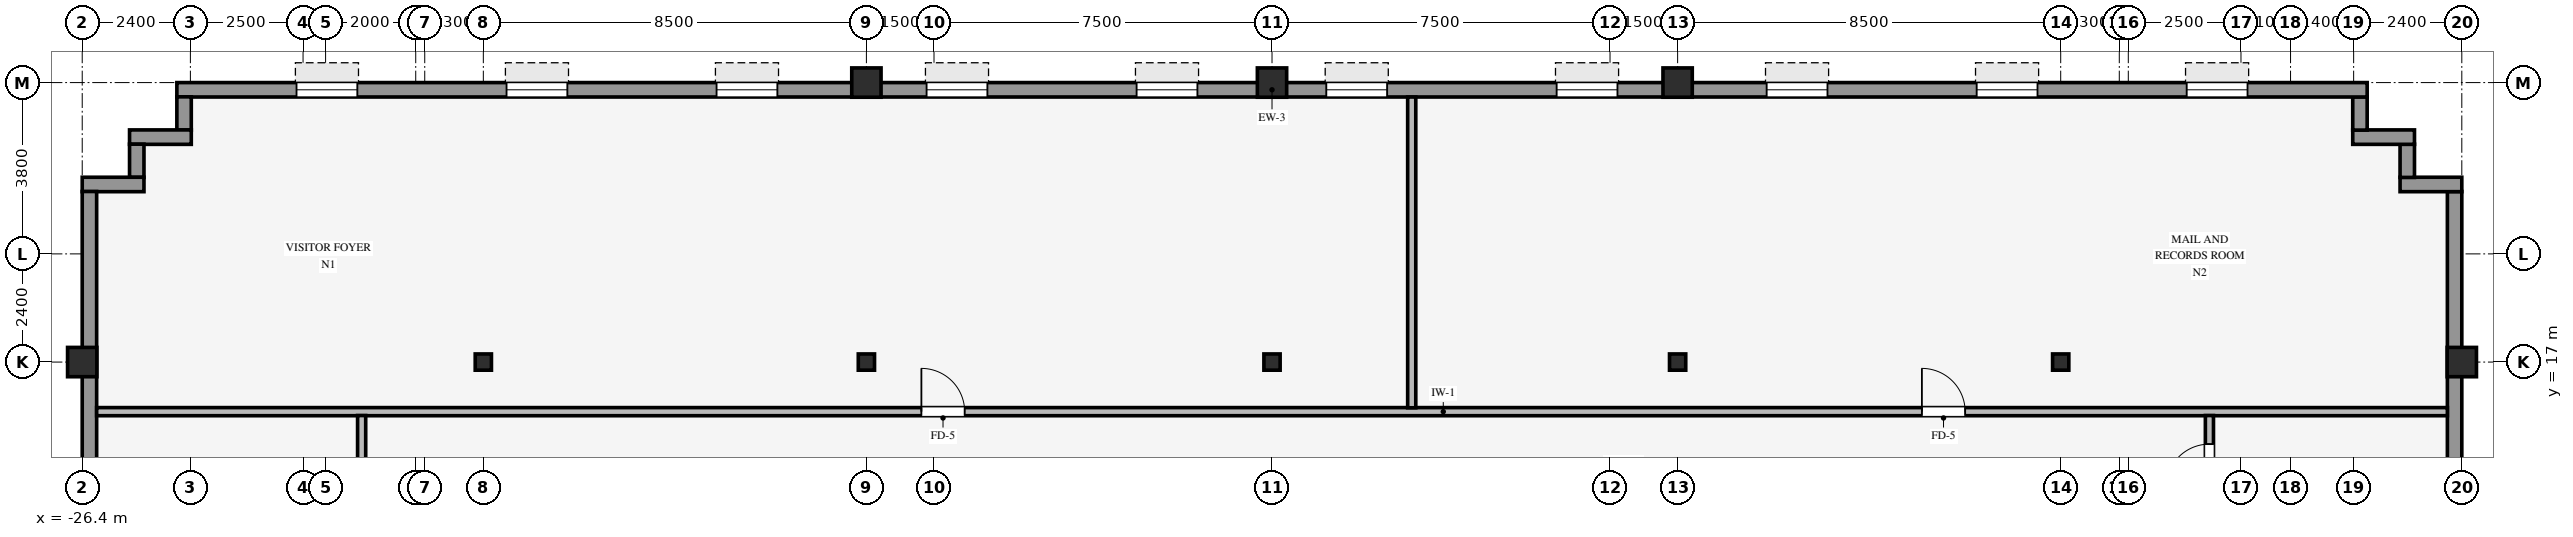
"""IFC4 building model, lengths in metres.
Left out: names, types, materials, properties, quantities, classifications, styles, units other than length and angle.
Written with IfcOpenShell. Run it as: python <this file> out.ifc"""

import sys

from ifc_helpers import new_model, si_unit, direction, frame, frame_2d, origin, origin_2d, place, context, subcontext, project, spatial, rectangle, hollow_rectangle, i_section, extrude, source, transform, mapped, element, fill, save


model = new_model("IFC4")
c1 = context("Model", 3, precision=1e-05, world=origin(), true_north=direction((0.0, 1.0)))
c2 = subcontext(c1, "Body", "Model", "MODEL_VIEW")
j1 = project(units=[si_unit("LENGTHUNIT", "METRE"), si_unit("PLANEANGLEUNIT", "RADIAN")], contexts=[c1])
p1 = place(None, origin())
s1 = spatial("IfcSite", under=j1, at=p1, CompositionType="ELEMENT")
p2 = place(p1, origin())
s2 = spatial("IfcBuilding", under=s1, at=p2, CompositionType="ELEMENT")
p3 = place(p2, frame((0.0, 0.0, 127.5)))
s3 = spatial("IfcBuildingStorey", under=s2, at=p3, CompositionType="ELEMENT", Elevation=127.5)
for number, where, z_axis, x_axis in (
    (1, (-26.4, 17.0, 0.0), (0.0, 0.0, 1.0), (1.0, 0.0, 0.0)),
    (2, (26.4, 17.0, 0.0), (0.0, 0.0, 1.0), (1.0, 0.0, 0.0)),
    (3, (-9.0, 23.2, 0.0), (0.0, 0.0, 1.0), (1.0, 0.0, 0.0)),
    (4, (0.0, 23.2, 0.0), (0.0, 0.0, 1.0), (1.0, 0.0, 0.0)),
    (5, (9.0, 23.2, 0.0), (0.0, 0.0, 1.0), (1.0, 0.0, 0.0)),
):
    element("IfcColumn", number, at=place(p3, frame(where, z_axis=z_axis, x_axis=x_axis)), inside=s3, PredefinedType="COLUMN", context=c2, shape_type="SweptSolid", body=[
        extrude(hollow_rectangle(XDim=0.65, YDim=0.65, WallThickness=0.04, InnerFilletRadius=0.04, OuterFilletRadius=0.08, at=origin_2d()), origin(), (0.0, 0.0, 1.0), 3.37),
    ])
for number, where, z_axis, x_axis in (
    (6, (0.0, 17.0, 0.0), (0.0, 0.0, 1.0), (1.0, 0.0, 0.0)),
    (7, (-17.5, 17.0, 0.0), (0.0, 0.0, 1.0), (1.0, 0.0, 0.0)),
    (8, (-9.0, 17.0, 0.0), (0.0, 0.0, 1.0), (1.0, 0.0, 0.0)),
    (9, (9.0, 17.0, 0.0), (0.0, 0.0, 1.0), (1.0, 0.0, 0.0)),
    (10, (17.5, 17.0, 0.0), (0.0, 0.0, 1.0), (1.0, 0.0, 0.0)),
):
    element("IfcColumn", number, at=place(p3, frame(where, z_axis=z_axis, x_axis=x_axis)), inside=s3, PredefinedType="COLUMN", context=c2, shape_type="SweptSolid", body=[
        extrude(i_section(OverallWidth=0.36, OverallDepth=0.36, WebThickness=0.021, FlangeThickness=0.021, FilletRadius=0.018, at=origin_2d()), origin(), (0.0, 0.0, 1.0), 3.37),
    ])
p4 = place(p3, frame((26.24, -20.784, 0.0), z_axis=(0.0, 0.0, 1.0), x_axis=(0.0, 1.0, 0.0)))
e11 = element("IfcWall", 11, at=p4, inside=s3, PredefinedType="STANDARD", context=c2, shape_type="SweptSolid", body=[
    extrude(rectangle(XDim=41.568, YDim=0.32, at=frame_2d((20.784, 0.0))), origin(), (0.0, 0.0, 1.0), 2.705),
])
p5 = place(p4, frame((7.369, 0.0, 0.8)))
e12 = element("IfcOpeningElement", 12, at=p5, cuts=e11, PredefinedType="OPENING", context=c2, shape_type="SweptSolid", body=[
    extrude(rectangle(XDim=2.1, YDim=1.56, at=frame_2d((1.05, 0.78))), frame((0.0, 0.17, 0.0), z_axis=(0.0, -1.0, 0.0), x_axis=(1.0, 0.0, 0.0)), (0.0, 0.0, 1.0), 0.34),
])
p6 = place(p4, frame((12.315, 0.0, 0.8)))
e13 = element("IfcOpeningElement", 13, at=p6, cuts=e11, PredefinedType="OPENING", context=c2, shape_type="SweptSolid", body=[
    extrude(rectangle(XDim=2.1, YDim=1.56, at=frame_2d((1.05, 0.78))), frame((0.0, 0.17, 0.0), z_axis=(0.0, -1.0, 0.0), x_axis=(1.0, 0.0, 0.0)), (0.0, 0.0, 1.0), 0.34),
])
p7 = place(p4, frame((17.711, 0.0, 0.8)))
e14 = element("IfcOpeningElement", 14, at=p7, cuts=e11, PredefinedType="OPENING", context=c2, shape_type="SweptSolid", body=[
    extrude(rectangle(XDim=2.1, YDim=1.56, at=frame_2d((1.05, 0.78))), frame((0.0, 0.17, 0.0), z_axis=(0.0, -1.0, 0.0), x_axis=(1.0, 0.0, 0.0)), (0.0, 0.0, 1.0), 0.34),
])
p8 = place(p4, frame((22.207, 0.0, 0.8)))
e15 = element("IfcOpeningElement", 15, at=p8, cuts=e11, PredefinedType="OPENING", context=c2, shape_type="SweptSolid", body=[
    extrude(rectangle(XDim=2.1, YDim=1.56, at=frame_2d((1.05, 0.78))), frame((0.0, 0.17, 0.0), z_axis=(0.0, -1.0, 0.0), x_axis=(1.0, 0.0, 0.0)), (0.0, 0.0, 1.0), 0.34),
])
p9 = place(p4, frame((27.153, 0.0, 0.8)))
e16 = element("IfcOpeningElement", 16, at=p9, cuts=e11, PredefinedType="OPENING", context=c2, shape_type="SweptSolid", body=[
    extrude(rectangle(XDim=2.1, YDim=1.56, at=frame_2d((1.05, 0.78))), frame((0.0, 0.17, 0.0), z_axis=(0.0, -1.0, 0.0), x_axis=(1.0, 0.0, 0.0)), (0.0, 0.0, 1.0), 0.34),
])
p10 = place(p4, frame((32.099, 0.0, 0.8)))
e17 = element("IfcOpeningElement", 17, at=p10, cuts=e11, PredefinedType="OPENING", context=c2, shape_type="SweptSolid", body=[
    extrude(rectangle(XDim=2.1, YDim=1.56, at=frame_2d((1.05, 0.78))), frame((0.0, 0.17, 0.0), z_axis=(0.0, -1.0, 0.0), x_axis=(1.0, 0.0, 0.0)), (0.0, 0.0, 1.0), 0.34),
])
p11 = place(p3, frame((25.03, 20.94, 0.0), z_axis=(0.0, 0.0, 1.0), x_axis=(1.0, 0.0, 0.0)))
e18 = element("IfcWall", 18, at=p11, inside=s3, PredefinedType="STANDARD", context=c2, shape_type="SweptSolid", body=[
    extrude(rectangle(XDim=1.37, YDim=0.32, at=frame_2d((0.685, 0.0))), origin(), (0.0, 0.0, 1.0), 3.36),
])
p12 = place(p3, frame((25.19, 21.096, 0.0), z_axis=(0.0, 0.0, 1.0), x_axis=(0.0, 1.0, 0.0)))
e19 = element("IfcWall", 19, at=p12, inside=s3, PredefinedType="STANDARD", context=c2, shape_type="SweptSolid", body=[
    extrude(rectangle(XDim=0.738, YDim=0.32, at=frame_2d((0.369, 0.0))), origin(), (0.0, 0.0, 1.0), 3.36),
])
p13 = place(p3, frame((23.98, 21.99, 0.0), z_axis=(0.0, 0.0, 1.0), x_axis=(1.0, 0.0, 0.0)))
e20 = element("IfcWall", 20, at=p13, inside=s3, PredefinedType="STANDARD", context=c2, shape_type="SweptSolid", body=[
    extrude(rectangle(XDim=1.37, YDim=0.32, at=frame_2d((0.685, 0.0))), origin(), (0.0, 0.0, 1.0), 3.36),
])
p14 = place(p3, frame((24.14, 22.146, 0.0), z_axis=(0.0, 0.0, 1.0), x_axis=(0.0, 1.0, 0.0)))
e21 = element("IfcWall", 21, at=p14, inside=s3, PredefinedType="STANDARD", context=c2, shape_type="SweptSolid", body=[
    extrude(rectangle(XDim=0.738, YDim=0.32, at=frame_2d((0.369, 0.0))), origin(), (0.0, 0.0, 1.0), 3.36),
])
p15 = place(p3, frame((-24.3, 23.04, 0.0), z_axis=(0.0, 0.0, 1.0), x_axis=(1.0, 0.0, 0.0)))
e22 = element("IfcWall", 22, at=p15, inside=s3, PredefinedType="STANDARD", context=c2, shape_type="SweptSolid", body=[
    extrude(rectangle(XDim=48.6, YDim=0.32, at=frame_2d((24.3, 0.0))), origin(), (0.0, 0.0, 1.0), 2.705),
])
p16 = place(p15, frame((2.655, 0.0, 0.8)))
e23 = element("IfcOpeningElement", 23, at=p16, cuts=e22, PredefinedType="OPENING", context=c2, shape_type="SweptSolid", body=[
    extrude(rectangle(XDim=1.35, YDim=1.56, at=frame_2d((0.675, 0.78))), frame((0.0, 0.17, 0.0), z_axis=(0.0, -1.0, 0.0), x_axis=(1.0, 0.0, 0.0)), (0.0, 0.0, 1.0), 0.34),
])
p17 = place(p15, frame((7.315, 0.0, 0.8)))
e24 = element("IfcOpeningElement", 24, at=p17, cuts=e22, PredefinedType="OPENING", context=c2, shape_type="SweptSolid", body=[
    extrude(rectangle(XDim=1.35, YDim=1.56, at=frame_2d((0.675, 0.78))), frame((0.0, 0.17, 0.0), z_axis=(0.0, -1.0, 0.0), x_axis=(1.0, 0.0, 0.0)), (0.0, 0.0, 1.0), 0.34),
])
p18 = place(p15, frame((11.975, 0.0, 0.8)))
e25 = element("IfcOpeningElement", 25, at=p18, cuts=e22, PredefinedType="OPENING", context=c2, shape_type="SweptSolid", body=[
    extrude(rectangle(XDim=1.35, YDim=1.56, at=frame_2d((0.675, 0.78))), frame((0.0, 0.17, 0.0), z_axis=(0.0, -1.0, 0.0), x_axis=(1.0, 0.0, 0.0)), (0.0, 0.0, 1.0), 0.34),
])
p19 = place(p15, frame((16.635, 0.0, 0.8)))
e26 = element("IfcOpeningElement", 26, at=p19, cuts=e22, PredefinedType="OPENING", context=c2, shape_type="SweptSolid", body=[
    extrude(rectangle(XDim=1.35, YDim=1.56, at=frame_2d((0.675, 0.78))), frame((0.0, 0.17, 0.0), z_axis=(0.0, -1.0, 0.0), x_axis=(1.0, 0.0, 0.0)), (0.0, 0.0, 1.0), 0.34),
])
p20 = place(p15, frame((21.295, 0.0, 0.8)))
e27 = element("IfcOpeningElement", 27, at=p20, cuts=e22, PredefinedType="OPENING", context=c2, shape_type="SweptSolid", body=[
    extrude(rectangle(XDim=1.35, YDim=1.56, at=frame_2d((0.675, 0.78))), frame((0.0, 0.17, 0.0), z_axis=(0.0, -1.0, 0.0), x_axis=(1.0, 0.0, 0.0)), (0.0, 0.0, 1.0), 0.34),
])
p21 = place(p15, frame((25.505, 0.0, 0.8)))
e28 = element("IfcOpeningElement", 28, at=p21, cuts=e22, PredefinedType="OPENING", context=c2, shape_type="SweptSolid", body=[
    extrude(rectangle(XDim=1.35, YDim=1.56, at=frame_2d((0.675, 0.78))), frame((0.0, 0.17, 0.0), z_axis=(0.0, -1.0, 0.0), x_axis=(1.0, 0.0, 0.0)), (0.0, 0.0, 1.0), 0.34),
])
p22 = place(p15, frame((30.615, 0.0, 0.8)))
e29 = element("IfcOpeningElement", 29, at=p22, cuts=e22, PredefinedType="OPENING", context=c2, shape_type="SweptSolid", body=[
    extrude(rectangle(XDim=1.35, YDim=1.56, at=frame_2d((0.675, 0.78))), frame((0.0, 0.17, 0.0), z_axis=(0.0, -1.0, 0.0), x_axis=(1.0, 0.0, 0.0)), (0.0, 0.0, 1.0), 0.34),
])
p23 = place(p15, frame((35.275, 0.0, 0.8)))
e30 = element("IfcOpeningElement", 30, at=p23, cuts=e22, PredefinedType="OPENING", context=c2, shape_type="SweptSolid", body=[
    extrude(rectangle(XDim=1.35, YDim=1.56, at=frame_2d((0.675, 0.78))), frame((0.0, 0.17, 0.0), z_axis=(0.0, -1.0, 0.0), x_axis=(1.0, 0.0, 0.0)), (0.0, 0.0, 1.0), 0.34),
])
p24 = place(p15, frame((39.935, 0.0, 0.8)))
e31 = element("IfcOpeningElement", 31, at=p24, cuts=e22, PredefinedType="OPENING", context=c2, shape_type="SweptSolid", body=[
    extrude(rectangle(XDim=1.35, YDim=1.56, at=frame_2d((0.675, 0.78))), frame((0.0, 0.17, 0.0), z_axis=(0.0, -1.0, 0.0), x_axis=(1.0, 0.0, 0.0)), (0.0, 0.0, 1.0), 0.34),
])
p25 = place(p15, frame((44.595, 0.0, 0.8)))
e32 = element("IfcOpeningElement", 32, at=p25, cuts=e22, PredefinedType="OPENING", context=c2, shape_type="SweptSolid", body=[
    extrude(rectangle(XDim=1.35, YDim=1.56, at=frame_2d((0.675, 0.78))), frame((0.0, 0.17, 0.0), z_axis=(0.0, -1.0, 0.0), x_axis=(1.0, 0.0, 0.0)), (0.0, 0.0, 1.0), 0.34),
])
p26 = place(p3, frame((-24.14, 22.146, 0.0), z_axis=(0.0, 0.0, 1.0), x_axis=(0.0, 1.0, 0.0)))
e33 = element("IfcWall", 33, at=p26, inside=s3, PredefinedType="STANDARD", context=c2, shape_type="SweptSolid", body=[
    extrude(rectangle(XDim=0.738, YDim=0.32, at=frame_2d((0.369, 0.0))), origin(), (0.0, 0.0, 1.0), 3.36),
])
p27 = place(p3, frame((-25.35, 21.99, 0.0), z_axis=(0.0, 0.0, 1.0), x_axis=(1.0, 0.0, 0.0)))
e34 = element("IfcWall", 34, at=p27, inside=s3, PredefinedType="STANDARD", context=c2, shape_type="SweptSolid", body=[
    extrude(rectangle(XDim=1.37, YDim=0.32, at=frame_2d((0.685, 0.0))), origin(), (0.0, 0.0, 1.0), 3.36),
])
p28 = place(p3, frame((-25.19, 21.096, 0.0), z_axis=(0.0, 0.0, 1.0), x_axis=(0.0, 1.0, 0.0)))
e35 = element("IfcWall", 35, at=p28, inside=s3, PredefinedType="STANDARD", context=c2, shape_type="SweptSolid", body=[
    extrude(rectangle(XDim=0.738, YDim=0.32, at=frame_2d((0.369, 0.0))), origin(), (0.0, 0.0, 1.0), 3.36),
])
p29 = place(p3, frame((-26.4, 20.94, 0.0), z_axis=(0.0, 0.0, 1.0), x_axis=(1.0, 0.0, 0.0)))
e36 = element("IfcWall", 36, at=p29, inside=s3, PredefinedType="STANDARD", context=c2, shape_type="SweptSolid", body=[
    extrude(rectangle(XDim=1.37, YDim=0.32, at=frame_2d((0.685, 0.0))), origin(), (0.0, 0.0, 1.0), 3.36),
])
p30 = place(p3, frame((-26.24, -20.784, 0.0), z_axis=(0.0, 0.0, 1.0), x_axis=(0.0, 1.0, 0.0)))
e37 = element("IfcWall", 37, at=p30, inside=s3, PredefinedType="STANDARD", context=c2, shape_type="SweptSolid", body=[
    extrude(rectangle(XDim=41.568, YDim=0.32, at=frame_2d((20.784, 0.0))), origin(), (0.0, 0.0, 1.0), 2.705),
])
p31 = place(p30, frame((7.369, 0.0, 0.8)))
e38 = element("IfcOpeningElement", 38, at=p31, cuts=e37, PredefinedType="OPENING", context=c2, shape_type="SweptSolid", body=[
    extrude(rectangle(XDim=2.1, YDim=1.56, at=frame_2d((1.05, 0.78))), frame((0.0, 0.17, 0.0), z_axis=(0.0, -1.0, 0.0), x_axis=(1.0, 0.0, 0.0)), (0.0, 0.0, 1.0), 0.34),
])
p32 = place(p30, frame((12.315, 0.0, 0.8)))
e39 = element("IfcOpeningElement", 39, at=p32, cuts=e37, PredefinedType="OPENING", context=c2, shape_type="SweptSolid", body=[
    extrude(rectangle(XDim=2.1, YDim=1.56, at=frame_2d((1.05, 0.78))), frame((0.0, 0.17, 0.0), z_axis=(0.0, -1.0, 0.0), x_axis=(1.0, 0.0, 0.0)), (0.0, 0.0, 1.0), 0.34),
])
p33 = place(p30, frame((17.711, 0.0, 0.8)))
e40 = element("IfcOpeningElement", 40, at=p33, cuts=e37, PredefinedType="OPENING", context=c2, shape_type="SweptSolid", body=[
    extrude(rectangle(XDim=2.1, YDim=1.56, at=frame_2d((1.05, 0.78))), frame((0.0, 0.17, 0.0), z_axis=(0.0, -1.0, 0.0), x_axis=(1.0, 0.0, 0.0)), (0.0, 0.0, 1.0), 0.34),
])
p34 = place(p30, frame((22.207, 0.0, 0.8)))
e41 = element("IfcOpeningElement", 41, at=p34, cuts=e37, PredefinedType="OPENING", context=c2, shape_type="SweptSolid", body=[
    extrude(rectangle(XDim=2.1, YDim=1.56, at=frame_2d((1.05, 0.78))), frame((0.0, 0.17, 0.0), z_axis=(0.0, -1.0, 0.0), x_axis=(1.0, 0.0, 0.0)), (0.0, 0.0, 1.0), 0.34),
])
p35 = place(p30, frame((27.153, 0.0, 0.8)))
e42 = element("IfcOpeningElement", 42, at=p35, cuts=e37, PredefinedType="OPENING", context=c2, shape_type="SweptSolid", body=[
    extrude(rectangle(XDim=2.1, YDim=1.56, at=frame_2d((1.05, 0.78))), frame((0.0, 0.17, 0.0), z_axis=(0.0, -1.0, 0.0), x_axis=(1.0, 0.0, 0.0)), (0.0, 0.0, 1.0), 0.34),
])
p36 = place(p30, frame((32.099, 0.0, 0.8)))
e43 = element("IfcOpeningElement", 43, at=p36, cuts=e37, PredefinedType="OPENING", context=c2, shape_type="SweptSolid", body=[
    extrude(rectangle(XDim=2.1, YDim=1.56, at=frame_2d((1.05, 0.78))), frame((0.0, 0.17, 0.0), z_axis=(0.0, -1.0, 0.0), x_axis=(1.0, 0.0, 0.0)), (0.0, 0.0, 1.0), 0.34),
])
p37 = place(p3, frame((-26.08, 15.9, 0.0), z_axis=(0.0, 0.0, 1.0), x_axis=(1.0, 0.0, 0.0)))
e44 = element("IfcWall", 44, at=p37, inside=s3, PredefinedType="PARTITIONING", context=c2, shape_type="SweptSolid", body=[
    extrude(rectangle(XDim=52.16, YDim=0.18, at=frame_2d((26.08, 0.0))), origin(), (0.0, 0.0, 1.0), 3.36),
])
p38 = place(p37, frame((18.3, 0.0, 0.0)))
e45 = element("IfcOpeningElement", 45, at=p38, cuts=e44, PredefinedType="OPENING", context=c2, shape_type="SweptSolid", body=[
    extrude(rectangle(XDim=0.96, YDim=2.1, at=frame_2d((0.48, 1.05))), frame((0.0, 0.1, 0.0), z_axis=(0.0, -1.0, 0.0), x_axis=(1.0, 0.0, 0.0)), (0.0, 0.0, 1.0), 0.2),
])
p39 = place(p37, frame((40.5, 0.0, 0.0)))
e46 = element("IfcOpeningElement", 46, at=p39, cuts=e44, PredefinedType="OPENING", context=c2, shape_type="SweptSolid", body=[
    extrude(rectangle(XDim=0.96, YDim=2.1, at=frame_2d((0.48, 1.05))), frame((0.0, 0.1, 0.0), z_axis=(0.0, -1.0, 0.0), x_axis=(1.0, 0.0, 0.0)), (0.0, 0.0, 1.0), 0.2),
])
p40 = place(p3, frame((-20.2, -15.814, 0.0), z_axis=(0.0, 0.0, 1.0), x_axis=(0.0, 1.0, 0.0)))
e47 = element("IfcWall", 47, at=p40, inside=s3, PredefinedType="PARTITIONING", context=c2, shape_type="SweptSolid", body=[
    extrude(rectangle(XDim=31.628, YDim=0.18, at=frame_2d((15.814, 0.0))), origin(), (0.0, 0.0, 1.0), 3.36),
])
p41 = place(p40, frame((20.334, 0.0, 0.0)))
e48 = element("IfcOpeningElement", 48, at=p41, cuts=e47, PredefinedType="OPENING", context=c2, shape_type="SweptSolid", body=[
    extrude(rectangle(XDim=0.96, YDim=2.1, at=frame_2d((0.48, 1.05))), frame((0.0, 0.1, 0.0), z_axis=(0.0, -1.0, 0.0), x_axis=(1.0, 0.0, 0.0)), (0.0, 0.0, 1.0), 0.2),
])
p42 = place(p40, frame((6.834, 0.0, 0.0)))
e49 = element("IfcOpeningElement", 49, at=p42, cuts=e47, PredefinedType="OPENING", context=c2, shape_type="SweptSolid", body=[
    extrude(rectangle(XDim=0.96, YDim=2.1, at=frame_2d((0.48, 1.05))), frame((0.0, 0.1, 0.0), z_axis=(0.0, -1.0, 0.0), x_axis=(1.0, 0.0, 0.0)), (0.0, 0.0, 1.0), 0.2),
])
p43 = place(p3, frame((3.1, 15.986, 0.0), z_axis=(0.0, 0.0, 1.0), x_axis=(0.0, 1.0, 0.0)))
e50 = element("IfcWall", 50, at=p43, inside=s3, PredefinedType="PARTITIONING", context=c2, shape_type="SweptSolid", body=[
    extrude(rectangle(XDim=6.894, YDim=0.18, at=frame_2d((3.447, 0.0))), origin(), (0.0, 0.0, 1.0), 3.36),
])
p44 = place(p3, frame((20.8, 13.586, 0.0), z_axis=(0.0, 0.0, 1.0), x_axis=(0.0, 1.0, 0.0)))
e51 = element("IfcWall", 51, at=p44, inside=s3, PredefinedType="PARTITIONING", context=c2, shape_type="SweptSolid", body=[
    extrude(rectangle(XDim=2.228, YDim=0.18, at=frame_2d((1.114, 0.0))), origin(), (0.0, 0.0, 1.0), 3.36),
])
p45 = place(p44, frame((0.634, 0.0, 0.0)))
e52 = element("IfcOpeningElement", 52, at=p45, cuts=e51, PredefinedType="OPENING", context=c2, shape_type="SweptSolid", body=[
    extrude(rectangle(XDim=0.96, YDim=2.1, at=frame_2d((0.48, 1.05))), frame((0.0, 0.1, 0.0), z_axis=(0.0, -1.0, 0.0), x_axis=(1.0, 0.0, 0.0)), (0.0, 0.0, 1.0), 0.2),
])
m1 = source(origin(), c2, "Body", "SweptSolid", [
    extrude(rectangle(XDim=1.35, YDim=1.56, at=frame_2d((0.675, 0.78))), frame((0.0, 0.03, 0.0), z_axis=(0.0, -1.0, 0.0), x_axis=(1.0, 0.0, 0.0)), (0.0, 0.0, 1.0), 0.06),
])
p46 = place(p16, origin())
e53 = element("IfcWindow", 53, at=p46, inside=s3, PartitioningType="SINGLE_PANEL", PredefinedType="WINDOW", context=c2, shape_type="MappedRepresentation", body=[
    mapped(m1, transform((0.0, 0.0, 0.0), scale=1.0)),
])
fill(e23, e53)
p47 = place(p17, origin())
e54 = element("IfcWindow", 54, at=p47, inside=s3, PartitioningType="SINGLE_PANEL", PredefinedType="WINDOW", context=c2, shape_type="MappedRepresentation", body=[
    mapped(m1, transform((0.0, 0.0, 0.0), scale=1.0)),
])
fill(e24, e54)
p48 = place(p18, origin())
e55 = element("IfcWindow", 55, at=p48, inside=s3, PartitioningType="SINGLE_PANEL", PredefinedType="WINDOW", context=c2, shape_type="MappedRepresentation", body=[
    mapped(m1, transform((0.0, 0.0, 0.0), scale=1.0)),
])
fill(e25, e55)
p49 = place(p19, origin())
e56 = element("IfcWindow", 56, at=p49, inside=s3, PartitioningType="SINGLE_PANEL", PredefinedType="WINDOW", context=c2, shape_type="MappedRepresentation", body=[
    mapped(m1, transform((0.0, 0.0, 0.0), scale=1.0)),
])
fill(e26, e56)
p50 = place(p20, origin())
e57 = element("IfcWindow", 57, at=p50, inside=s3, PartitioningType="SINGLE_PANEL", PredefinedType="WINDOW", context=c2, shape_type="MappedRepresentation", body=[
    mapped(m1, transform((0.0, 0.0, 0.0), scale=1.0)),
])
fill(e27, e57)
p51 = place(p21, origin())
e58 = element("IfcWindow", 58, at=p51, inside=s3, PartitioningType="SINGLE_PANEL", PredefinedType="WINDOW", context=c2, shape_type="MappedRepresentation", body=[
    mapped(m1, transform((0.0, 0.0, 0.0), scale=1.0)),
])
fill(e28, e58)
p52 = place(p22, origin())
e59 = element("IfcWindow", 59, at=p52, inside=s3, PartitioningType="SINGLE_PANEL", PredefinedType="WINDOW", context=c2, shape_type="MappedRepresentation", body=[
    mapped(m1, transform((0.0, 0.0, 0.0), scale=1.0)),
])
fill(e29, e59)
p53 = place(p23, origin())
e60 = element("IfcWindow", 60, at=p53, inside=s3, PartitioningType="SINGLE_PANEL", PredefinedType="WINDOW", context=c2, shape_type="MappedRepresentation", body=[
    mapped(m1, transform((0.0, 0.0, 0.0), scale=1.0)),
])
fill(e30, e60)
p54 = place(p24, origin())
e61 = element("IfcWindow", 61, at=p54, inside=s3, PartitioningType="SINGLE_PANEL", PredefinedType="WINDOW", context=c2, shape_type="MappedRepresentation", body=[
    mapped(m1, transform((0.0, 0.0, 0.0), scale=1.0)),
])
fill(e31, e61)
p55 = place(p25, origin())
e62 = element("IfcWindow", 62, at=p55, inside=s3, PartitioningType="SINGLE_PANEL", PredefinedType="WINDOW", context=c2, shape_type="MappedRepresentation", body=[
    mapped(m1, transform((0.0, 0.0, 0.0), scale=1.0)),
])
fill(e32, e62)
m2 = source(origin(), c2, "Body", "SweptSolid", [
    extrude(rectangle(XDim=0.96, YDim=2.1, at=frame_2d((0.48, 1.05))), frame((0.0, 0.025, 0.0), z_axis=(0.0, -1.0, 0.0), x_axis=(1.0, 0.0, 0.0)), (0.0, 0.0, 1.0), 0.05),
])
p56 = place(p38, origin())
e63 = element("IfcDoor", 63, at=p56, inside=s3, OperationType="SINGLE_SWING_LEFT", PredefinedType="DOOR", context=c2, shape_type="MappedRepresentation", body=[
    mapped(m2, transform((0.0, 0.0, 0.0), scale=1.0)),
])
fill(e45, e63)
p57 = place(p39, origin())
e64 = element("IfcDoor", 64, at=p57, inside=s3, OperationType="SINGLE_SWING_LEFT", PredefinedType="DOOR", context=c2, shape_type="MappedRepresentation", body=[
    mapped(m2, transform((0.0, 0.0, 0.0), scale=1.0)),
])
fill(e46, e64)
p58 = place(p45, origin())
e65 = element("IfcDoor", 65, at=p58, inside=s3, OperationType="SINGLE_SWING_LEFT", PredefinedType="DOOR", context=c2, shape_type="MappedRepresentation", body=[
    mapped(m2, transform((0.0, 0.0, 0.0), scale=1.0)),
])
fill(e52, e65)
save(model, sys.argv[1])
